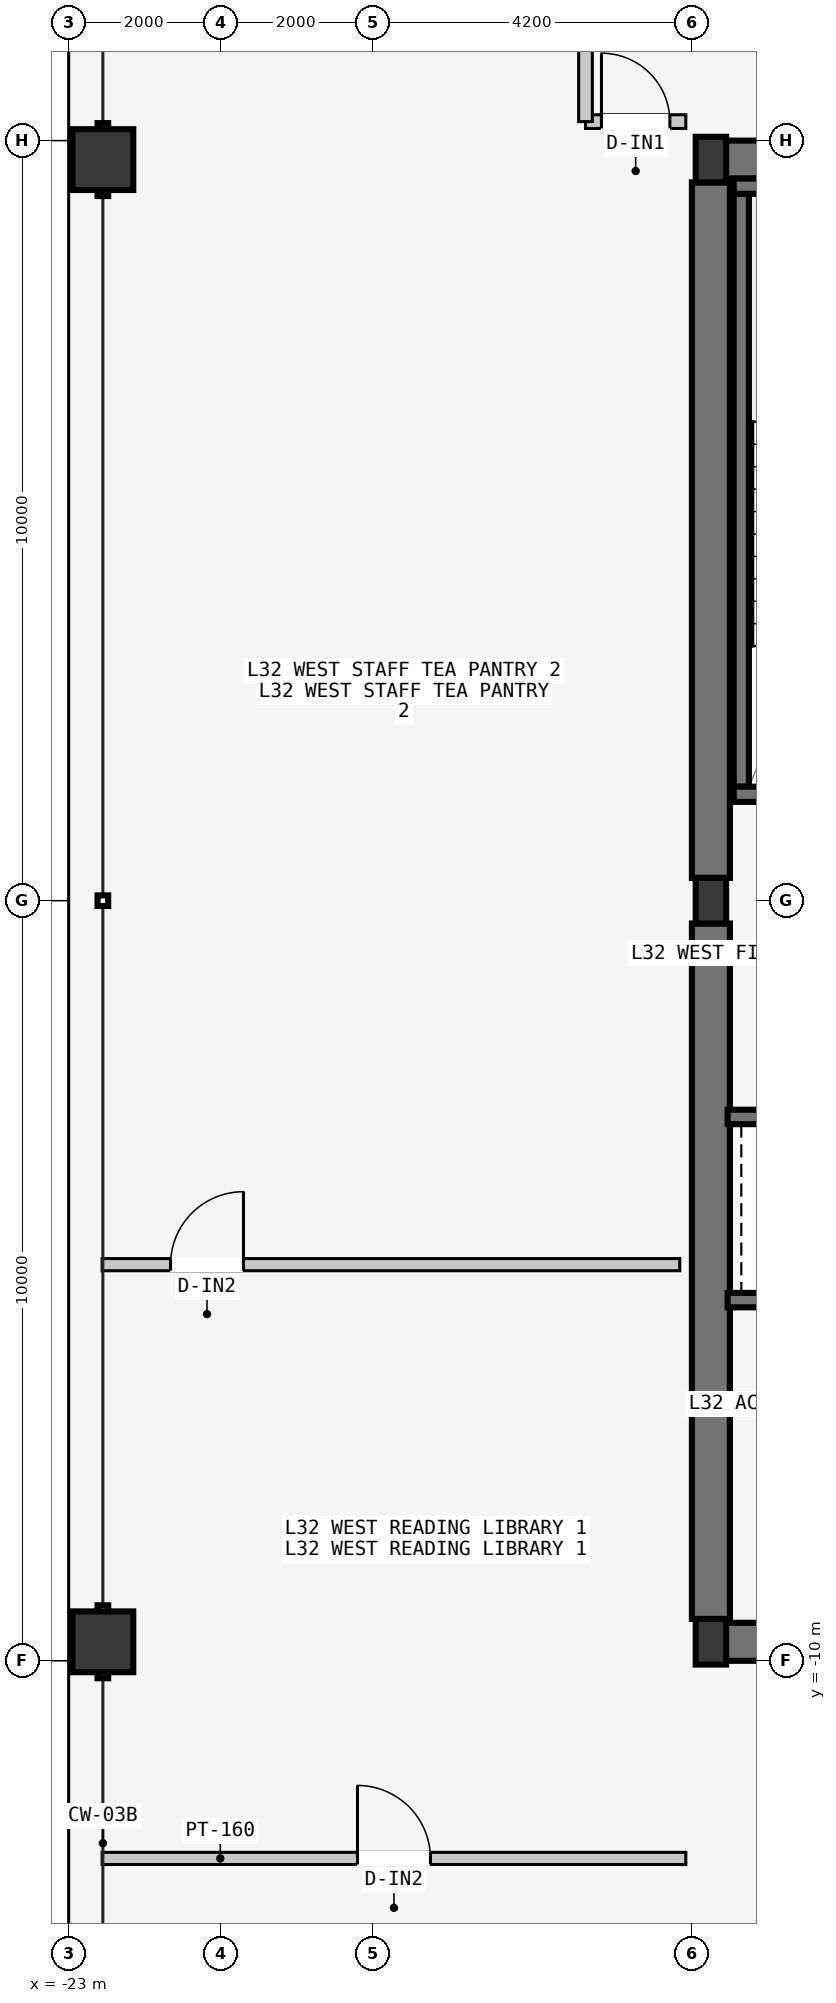
"""IFC4 building model, lengths in metres.
Left out: names, types, materials, properties, quantities, classifications, styles, units other than length and angle.
Written with IfcOpenShell. Run it as: python <this file> out.ifc"""

import sys

from ifc_helpers import new_model, si_unit, direction, frame, frame_2d, origin, origin_2d, place, context, subcontext, project, spatial, rectangle, hollow_rectangle, i_section, extrude, element, fill, save


model = new_model("IFC4")
c1 = context("Model", 3, precision=1e-05, world=origin(), true_north=direction((0.0, 1.0)))
c2 = subcontext(c1, "Body", "Model", "MODEL_VIEW")
j1 = project(units=[si_unit("LENGTHUNIT", "METRE"), si_unit("PLANEANGLEUNIT", "RADIAN")], contexts=[c1])
p1 = place(None, origin())
s1 = spatial("IfcSite", under=j1, at=p1, CompositionType="ELEMENT")
p2 = place(p1, origin())
s2 = spatial("IfcBuilding", under=s1, at=p2, CompositionType="ELEMENT")
p3 = place(p2, frame((0.0, 0.0, 124.2)))
s3 = spatial("IfcBuildingStorey", under=s2, at=p3, CompositionType="ELEMENT", Elevation=124.2)
for number, where, z_axis, x_axis in (
    (1, (-14.53, -9.75, -0.2), (0.0, 0.0, 1.0), (1.0, 0.0, 0.0)),
    (2, (-14.53, 9.75, -0.2), (0.0, 0.0, 1.0), (1.0, 0.0, 0.0)),
):
    element("IfcWall", number, at=place(p3, frame(where, z_axis=z_axis, x_axis=x_axis)), inside=s3, PredefinedType="SHEAR", context=c2, shape_type="SweptSolid", body=[
        extrude(rectangle(XDim=6.46, YDim=0.5, at=frame_2d((3.23, 0.0))), origin(), (0.0, 0.0, 1.0), 3.6),
    ])
for number, where, z_axis, x_axis in (
    (3, (-14.55, -9.45, -0.2), (0.0, 0.0, 1.0), (0.0, 1.0, 0.0)),
    (4, (-14.55, 0.3, -0.2), (0.0, 0.0, 1.0), (0.0, 1.0, 0.0)),
):
    element("IfcWall", number, at=place(p3, frame(where, z_axis=z_axis, x_axis=x_axis)), inside=s3, PredefinedType="SHEAR", context=c2, shape_type="SweptSolid", body=[
        extrude(rectangle(XDim=9.15, YDim=0.5, at=frame_2d((4.575, 0.0))), origin(), (0.0, 0.0, 1.0), 3.6),
    ])
p4 = place(p3, frame((-14.15, 1.5, -0.2), z_axis=(0.0, 0.0, 1.0), x_axis=(0.0, 1.0, 0.0)))
e5 = element("IfcWall", 5, at=p4, inside=s3, PredefinedType="SOLIDWALL", context=c2, shape_type="SweptSolid", body=[
    extrude(rectangle(XDim=7.8, YDim=0.2, at=frame_2d((3.9, 0.0))), origin(), (0.0, 0.0, 1.0), 3.6),
])
p5 = place(p3, frame((-14.25, 1.4, -0.2), z_axis=(0.0, 0.0, 1.0), x_axis=(1.0, 0.0, 0.0)))
e6 = element("IfcWall", 6, at=p5, inside=s3, PredefinedType="SOLIDWALL", context=c2, shape_type="SweptSolid", body=[
    extrude(rectangle(XDim=3.72, YDim=0.2, at=frame_2d((1.86, 0.0))), origin(), (0.0, 0.0, 1.0), 3.6),
])
p6 = place(p5, frame((1.5, 0.0, 0.2)))
e7 = element("IfcOpeningElement", 7, at=p6, cuts=e6, PredefinedType="OPENING", context=c2, shape_type="SweptSolid", body=[
    extrude(rectangle(XDim=1.12, YDim=2.18, at=frame_2d((0.56, 1.09))), frame((0.0, 0.11, 0.0), z_axis=(0.0, -1.0, 0.0), x_axis=(1.0, 0.0, 0.0)), (0.0, 0.0, 1.0), 0.22),
])
p7 = place(p3, frame((-14.25, 9.4, -0.2), z_axis=(0.0, 0.0, 1.0), x_axis=(1.0, 0.0, 0.0)))
e8 = element("IfcWall", 8, at=p7, inside=s3, PredefinedType="SOLIDWALL", context=c2, shape_type="SweptSolid", body=[
    extrude(rectangle(XDim=3.72, YDim=0.2, at=frame_2d((1.86, 0.0))), origin(), (0.0, 0.0, 1.0), 3.6),
])
for number, where, z_axis, x_axis in (
    (9, (-14.55, -9.75, 0.0), (0.0, 0.0, 1.0), (1.0, 0.0, 0.0)),
    (10, (-14.55, 0.0, 0.0), (0.0, 0.0, 1.0), (1.0, 0.0, 0.0)),
    (11, (-14.55, 9.75, 0.0), (0.0, 0.0, 1.0), (1.0, 0.0, 0.0)),
):
    element("IfcColumn", number, at=place(p3, frame(where, z_axis=z_axis, x_axis=x_axis)), inside=s3, PredefinedType="COLUMN", context=c2, shape_type="SweptSolid", body=[
        extrude(i_section(OverallWidth=0.4, OverallDepth=0.6, WebThickness=0.022, FlangeThickness=0.036, at=origin_2d()), origin(), (0.0, 0.0, 1.0), 3.6),
    ])
for number, where, z_axis, x_axis in (
    (12, (-22.55, -9.75, 0.0), (0.0, 0.0, 1.0), (0.0, 1.0, 0.0)),
    (13, (-22.55, 9.75, 0.0), (0.0, 0.0, 1.0), (0.0, 1.0, 0.0)),
):
    element("IfcColumn", number, at=place(p3, frame(where, z_axis=z_axis, x_axis=x_axis)), inside=s3, PredefinedType="COLUMN", context=c2, shape_type="SweptSolid", body=[
        extrude(hollow_rectangle(XDim=0.8, YDim=0.8, WallThickness=0.036, at=origin_2d()), origin(), (0.0, 0.0, 1.0), 3.6),
    ])
p8 = place(p3, frame((-14.33, -2.845, -0.2), z_axis=(0.0, 0.0, 1.0), x_axis=(1.0, 0.0, 0.0)))
e14 = element("IfcWall", 14, at=p8, inside=s3, PredefinedType="SOLIDWALL", context=c2, shape_type="SweptSolid", body=[
    extrude(rectangle(XDim=2.68, YDim=0.19, at=frame_2d((1.34, 0.0))), origin(), (0.0, 0.0, 1.0), 3.6),
])
p9 = place(p8, frame((0.83, 0.0, 0.2)))
e15 = element("IfcOpeningElement", 15, at=p9, cuts=e14, PredefinedType="OPENING", context=c2, shape_type="SweptSolid", body=[
    extrude(rectangle(XDim=1.2, YDim=2.2, at=frame_2d((0.6, 1.1))), frame((0.0, 0.105, 0.0), z_axis=(0.0, -1.0, 0.0), x_axis=(1.0, 0.0, 0.0)), (0.0, 0.0, 1.0), 0.21),
])
p10 = place(p3, frame((-14.33, -5.255, -0.2), z_axis=(0.0, 0.0, 1.0), x_axis=(1.0, 0.0, 0.0)))
e16 = element("IfcWall", 16, at=p10, inside=s3, PredefinedType="SOLIDWALL", context=c2, shape_type="SweptSolid", body=[
    extrude(rectangle(XDim=2.68, YDim=0.19, at=frame_2d((1.34, 0.0))), origin(), (0.0, 0.0, 1.0), 3.6),
])
p11 = place(p3, frame((-22.56, -12.6, 0.0), z_axis=(0.0, 0.0, 1.0), x_axis=(1.0, 0.0, 0.0)))
e17 = element("IfcWall", 17, at=p11, inside=s3, PredefinedType="PARTITIONING", context=c2, shape_type="SweptSolid", body=[
    extrude(rectangle(XDim=7.68, YDim=0.16, at=frame_2d((3.84, 0.0))), origin(), (0.0, 0.0, 1.0), 3.4),
])
p12 = place(p11, frame((3.36, 0.0, 0.0)))
e18 = element("IfcOpeningElement", 18, at=p12, cuts=e17, PredefinedType="OPENING", context=c2, shape_type="SweptSolid", body=[
    extrude(rectangle(XDim=0.96, YDim=2.18, at=frame_2d((0.48, 1.09))), frame((0.0, 0.09, 0.0), z_axis=(0.0, -1.0, 0.0), x_axis=(1.0, 0.0, 0.0)), (0.0, 0.0, 1.0), 0.18),
])
p13 = place(p3, frame((-16.2, 10.25, 0.0), z_axis=(0.0, 0.0, 1.0), x_axis=(1.0, 0.0, 0.0)))
e19 = element("IfcWall", 19, at=p13, inside=s3, PredefinedType="PARTITIONING", context=c2, shape_type="SweptSolid", body=[
    extrude(rectangle(XDim=1.32, YDim=0.18, at=frame_2d((0.66, 0.0))), origin(), (0.0, 0.0, 1.0), 3.4),
])
p14 = place(p13, frame((0.21, 0.0, 0.0)))
e20 = element("IfcOpeningElement", 20, at=p14, cuts=e19, PredefinedType="OPENING", context=c2, shape_type="SweptSolid", body=[
    extrude(rectangle(XDim=0.9, YDim=2.15, at=frame_2d((0.45, 1.075))), frame((0.0, 0.1, 0.0), z_axis=(0.0, -1.0, 0.0), x_axis=(1.0, 0.0, 0.0)), (0.0, 0.0, 1.0), 0.2),
])
p15 = place(p3, frame((-16.2, 10.25, 0.0), z_axis=(0.0, 0.0, 1.0), x_axis=(0.0, 1.0, 0.0)))
e21 = element("IfcWall", 21, at=p15, inside=s3, PredefinedType="PARTITIONING", context=c2, shape_type="SweptSolid", body=[
    extrude(rectangle(XDim=1.95, YDim=0.18, at=frame_2d((0.975, 0.0))), origin(), (0.0, 0.0, 1.0), 3.4),
])
p16 = place(p3, frame((-22.56, -4.788, 0.0), z_axis=(0.0, 0.0, 1.0), x_axis=(1.0, 0.0, 0.0)))
e22 = element("IfcWall", 22, at=p16, inside=s3, PredefinedType="PARTITIONING", context=c2, shape_type="SweptSolid", body=[
    extrude(rectangle(XDim=7.6, YDim=0.16, at=frame_2d((3.8, 0.0))), origin(), (0.0, 0.0, 1.0), 3.4),
])
p17 = place(p16, frame((0.9, 0.0, 0.0)))
e23 = element("IfcOpeningElement", 23, at=p17, cuts=e22, PredefinedType="OPENING", context=c2, shape_type="SweptSolid", body=[
    extrude(rectangle(XDim=0.96, YDim=2.18, at=frame_2d((0.48, 1.09))), frame((0.0, 0.09, 0.0), z_axis=(0.0, -1.0, 0.0), x_axis=(1.0, 0.0, 0.0)), (0.0, 0.0, 1.0), 0.18),
])
p18 = place(p12, origin())
e24 = element("IfcDoor", 24, at=p18, inside=s3, OperationType="SINGLE_SWING_LEFT", PredefinedType="DOOR", context=c2, shape_type="SweptSolid", body=[
    extrude(rectangle(XDim=0.96, YDim=2.18, at=frame_2d((0.48, 1.09))), frame((0.0, 0.025, 0.0), z_axis=(0.0, -1.0, 0.0), x_axis=(1.0, 0.0, 0.0)), (0.0, 0.0, 1.0), 0.05),
])
fill(e18, e24)
p19 = place(p14, origin())
e25 = element("IfcDoor", 25, at=p19, inside=s3, OperationType="SINGLE_SWING_LEFT", PredefinedType="DOOR", context=c2, shape_type="SweptSolid", body=[
    extrude(rectangle(XDim=0.9, YDim=2.15, at=frame_2d((0.45, 1.075))), frame((0.0, 0.025, 0.0), z_axis=(0.0, -1.0, 0.0), x_axis=(1.0, 0.0, 0.0)), (0.0, 0.0, 1.0), 0.05),
])
fill(e20, e25)
p20 = place(p17, origin())
e26 = element("IfcDoor", 26, at=p20, inside=s3, OperationType="SINGLE_SWING_RIGHT", PredefinedType="DOOR", context=c2, shape_type="SweptSolid", body=[
    extrude(rectangle(XDim=0.96, YDim=2.18, at=frame_2d((0.48, 1.09))), frame((0.0, 0.025, 0.0), z_axis=(0.0, -1.0, 0.0), x_axis=(1.0, 0.0, 0.0)), (0.0, 0.0, 1.0), 0.05),
])
fill(e23, e26)
save(model, sys.argv[1])
